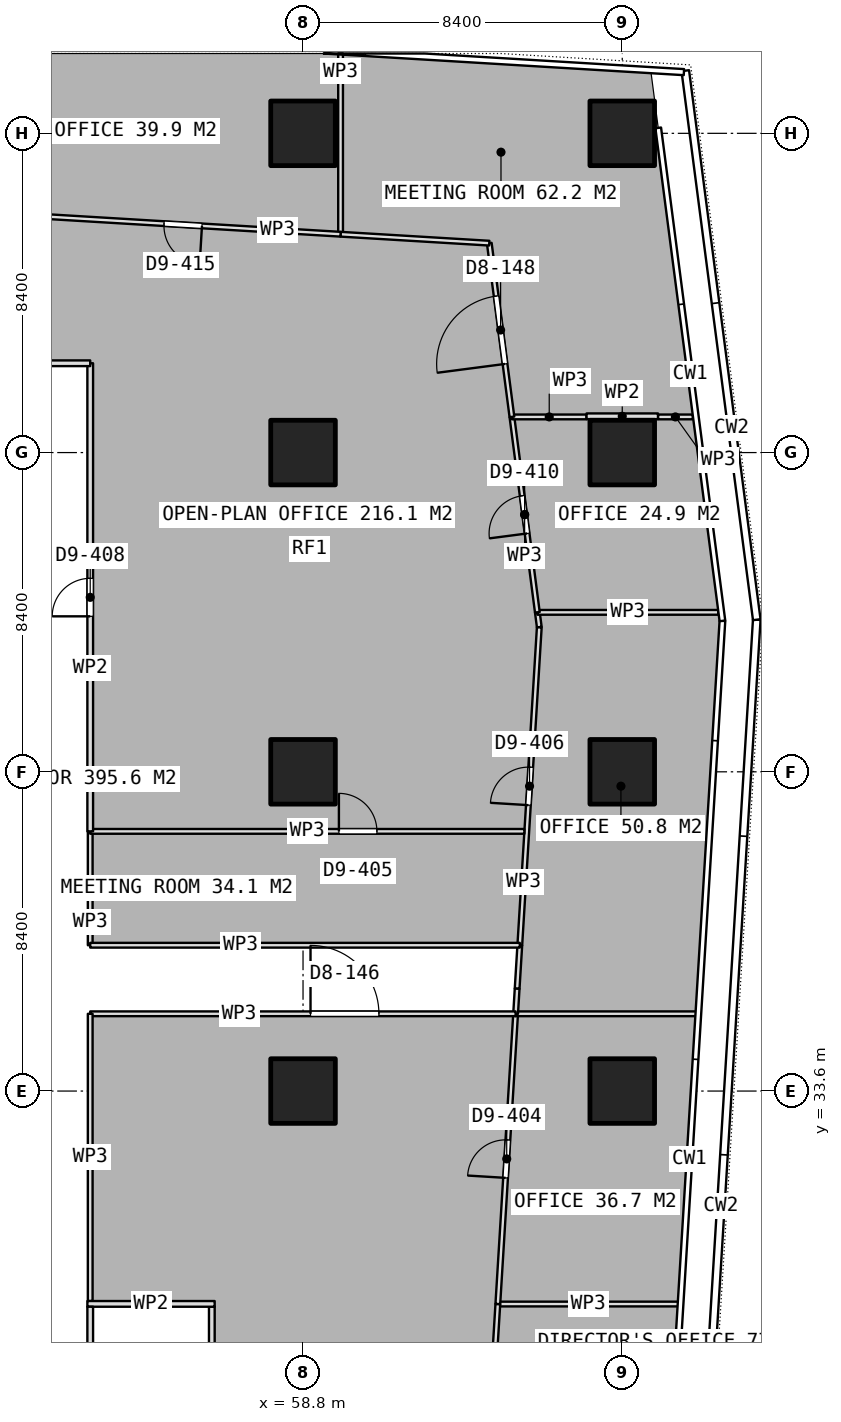
"""IFC4 building model, lengths in metres.
Left out: names, types, materials, properties, quantities, classifications, styles, units other than length and angle.
Written with IfcOpenShell. Run it as: python <this file> out.ifc"""

import sys

from ifc_helpers import new_model, si_unit, direction, frame, frame_2d, origin, origin_2d, place, context, subcontext, project, spatial, rectangle, extrude, element, fill, save


model = new_model("IFC4")
c1 = context("Model", 3, precision=1e-05, world=origin(), true_north=direction((0.0, 1.0)))
c2 = subcontext(c1, "Body", "Model", "MODEL_VIEW")
j1 = project(units=[si_unit("LENGTHUNIT", "METRE"), si_unit("PLANEANGLEUNIT", "RADIAN")], contexts=[c1])
p1 = place(None, origin())
s1 = spatial("IfcSite", under=j1, at=p1, CompositionType="ELEMENT")
p2 = place(p1, origin())
s2 = spatial("IfcBuilding", under=s1, at=p2, CompositionType="ELEMENT")
p3 = place(p2, frame((0.0, 0.0, 114.05)))
s3 = spatial("IfcBuildingStorey", under=s2, at=p3, CompositionType="ELEMENT", Elevation=114.05)
for number, where, z_axis, x_axis in (
    (1, (58.8, 33.6, 0.0), (0.0, 0.0, 1.0), (1.0, 0.0, 0.0)),
    (2, (58.8, 42.0, 0.0), (0.0, 0.0, 1.0), (1.0, 0.0, 0.0)),
    (3, (58.8, 50.4, 0.0), (0.0, 0.0, 1.0), (1.0, 0.0, 0.0)),
    (4, (58.8, 58.8, 0.0), (0.0, 0.0, 1.0), (1.0, 0.0, 0.0)),
    (5, (67.2, 33.6, 0.0), (0.0, 0.0, 1.0), (1.0, 0.0, 0.0)),
    (6, (67.2, 42.0, 0.0), (0.0, 0.0, 1.0), (1.0, 0.0, 0.0)),
    (7, (67.2, 50.4, 0.0), (0.0, 0.0, 1.0), (1.0, 0.0, 0.0)),
    (8, (67.2, 58.8, 0.0), (0.0, 0.0, 1.0), (1.0, 0.0, 0.0)),
):
    element("IfcColumn", number, at=place(p3, frame(where, z_axis=z_axis, x_axis=x_axis)), inside=s3, PredefinedType="COLUMN", context=c2, shape_type="SweptSolid", body=[
        extrude(rectangle(XDim=1.7, YDim=1.7, at=origin_2d()), origin(), (0.0, 0.0, 1.0), 3.75),
    ])
p4 = place(p3, frame((53.125, 28.0, 0.0), z_axis=(0.0, 0.0, 1.0), x_axis=(1.0, 0.0, 0.0)))
e9 = element("IfcWall", 9, at=p4, inside=s3, PredefinedType="PARTITIONING", context=c2, shape_type="SweptSolid", body=[
    extrude(rectangle(XDim=3.35, YDim=0.15, at=frame_2d((1.675, 0.0))), origin(), (0.0, 0.0, 1.0), 3.5),
])
p5 = place(p3, frame((53.2, 21.075, 0.0), z_axis=(0.0, 0.0, 1.0), x_axis=(0.0, 1.0, 0.0)))
e10 = element("IfcWall", 10, at=p5, inside=s3, PredefinedType="PARTITIONING", context=c2, shape_type="SweptSolid", body=[
    extrude(rectangle(XDim=6.85, YDim=0.15, at=frame_2d((3.425, 0.0))), origin(), (0.0, 0.0, 1.0), 3.5),
])
p6 = place(p5, frame((2.925, 0.0, 0.0)))
e11 = element("IfcOpeningElement", 11, at=p6, cuts=e10, PredefinedType="OPENING", context=c2, shape_type="SweptSolid", body=[
    extrude(rectangle(XDim=1.0, YDim=2.1, at=frame_2d((0.5, 1.05))), frame((0.0, 0.085, 0.0), z_axis=(0.0, -1.0, 0.0), x_axis=(1.0, 0.0, 0.0)), (0.0, 0.0, 1.0), 0.17),
])
p7 = place(p3, frame((56.4, 21.075, 0.0), z_axis=(0.0, 0.0, 1.0), x_axis=(0.0, 1.0, 0.0)))
e12 = element("IfcWall", 12, at=p7, inside=s3, PredefinedType="PARTITIONING", context=c2, shape_type="SweptSolid", body=[
    extrude(rectangle(XDim=6.85, YDim=0.15, at=frame_2d((3.425, 0.0))), origin(), (0.0, 0.0, 1.0), 3.5),
])
p8 = place(p3, frame((63.926, 27.996, 0.0), z_axis=(0.0, 0.0, 1.0), x_axis=(1.0, 0.0, 0.0)))
e13 = element("IfcWall", 13, at=p8, inside=s3, PredefinedType="PARTITIONING", context=c2, shape_type="SweptSolid", body=[
    extrude(rectangle(XDim=4.758, YDim=0.125, at=frame_2d((2.379, 0.0))), origin(), (0.0, 0.0, 1.0), 3.5),
])
p9 = place(p3, frame((63.476, 20.65, 0.0), z_axis=(0.0, 0.0, 1.0), x_axis=(0.061135017565, 0.998129505439, 0.0)))
e14 = element("IfcWall", 14, at=p9, inside=s3, PredefinedType="PARTITIONING", context=c2, shape_type="SweptSolid", body=[
    extrude(rectangle(XDim=7.36, YDim=0.125, at=frame_2d((3.68, 0.0))), origin(), (0.0, 0.0, 1.0), 3.5),
])
p10 = place(p9, frame((3.18, 0.0, 0.0)))
e15 = element("IfcOpeningElement", 15, at=p10, cuts=e14, PredefinedType="OPENING", context=c2, shape_type="SweptSolid", body=[
    extrude(rectangle(XDim=1.0, YDim=2.1, at=frame_2d((0.5, 1.05))), frame((0.0, 0.073, 0.0), z_axis=(0.0, -1.0, 0.0), x_axis=(1.0, 0.0, 0.0)), (0.0, 0.0, 1.0), 0.145),
])
p11 = place(p9, frame((2.08, 0.0, 0.0)))
e16 = element("IfcOpeningElement", 16, at=p11, cuts=e14, PredefinedType="OPENING", context=c2, shape_type="SweptSolid", body=[
    extrude(rectangle(XDim=1.0, YDim=2.1, at=frame_2d((0.5, 1.05))), frame((0.0, 0.073, 0.0), z_axis=(0.0, -1.0, 0.0), x_axis=(1.0, 0.0, 0.0)), (0.0, 0.0, 1.0), 0.145),
])
p12 = place(p3, frame((63.926, 27.997, 0.0), z_axis=(0.0, 0.0, 1.0), x_axis=(0.061176245149, 0.998126979412, 0.0)))
e17 = element("IfcWall", 17, at=p12, inside=s3, PredefinedType="PARTITIONING", context=c2, shape_type="SweptSolid", body=[
    extrude(rectangle(XDim=7.65, YDim=0.125, at=frame_2d((3.825, 0.0))), origin(), (0.0, 0.0, 1.0), 3.5),
])
p13 = place(p12, frame((3.325, 0.0, 0.0)))
e18 = element("IfcOpeningElement", 18, at=p13, cuts=e17, PredefinedType="OPENING", context=c2, shape_type="SweptSolid", body=[
    extrude(rectangle(XDim=1.0, YDim=2.1, at=frame_2d((0.5, 1.05))), frame((0.0, 0.073, 0.0), z_axis=(0.0, -1.0, 0.0), x_axis=(1.0, 0.0, 0.0)), (0.0, 0.0, 1.0), 0.145),
])
p14 = place(p3, frame((64.394, 35.633, 0.0), z_axis=(0.0, 0.0, 1.0), x_axis=(1.0, 0.0, 0.0)))
e19 = element("IfcWall", 19, at=p14, inside=s3, PredefinedType="PARTITIONING", context=c2, shape_type="SweptSolid", body=[
    extrude(rectangle(XDim=4.758, YDim=0.125, at=frame_2d((2.379, 0.0))), origin(), (0.0, 0.0, 1.0), 3.5),
])
p15 = place(p3, frame((64.434, 36.293, 0.0), z_axis=(0.0, 0.0, 1.0), x_axis=(0.060919506416, 0.998142682054, 0.0)))
e20 = element("IfcWall", 20, at=p15, inside=s3, PredefinedType="PARTITIONING", context=c2, shape_type="SweptSolid", body=[
    extrude(rectangle(XDim=1.146, YDim=0.125, at=frame_2d((0.573, 0.0))), origin(), (0.0, 0.0, 1.0), 3.5),
])
p16 = place(p3, frame((64.504, 37.437, 0.0), z_axis=(0.0, 0.0, 1.0), x_axis=(0.061198263672, 0.99812562963, 0.0)))
e21 = element("IfcWall", 21, at=p16, inside=s3, PredefinedType="PARTITIONING", context=c2, shape_type="SweptSolid", body=[
    extrude(rectangle(XDim=8.385, YDim=0.125, at=frame_2d((4.193, 0.0))), origin(), (0.0, 0.0, 1.0), 3.5),
])
p17 = place(p16, frame((3.693, 0.0, 0.0)))
e22 = element("IfcOpeningElement", 22, at=p17, cuts=e21, PredefinedType="OPENING", context=c2, shape_type="SweptSolid", body=[
    extrude(rectangle(XDim=1.0, YDim=2.1, at=frame_2d((0.5, 1.05))), frame((0.0, 0.073, 0.0), z_axis=(0.0, -1.0, 0.0), x_axis=(1.0, 0.0, 0.0)), (0.0, 0.0, 1.0), 0.145),
])
p18 = place(p3, frame((65.017, 45.807, 0.0), z_axis=(0.0, 0.0, 1.0), x_axis=(-0.130003962442, 0.991513474316, 0.0)))
e23 = element("IfcWall", 23, at=p18, inside=s3, PredefinedType="PARTITIONING", context=c2, shape_type="SweptSolid", body=[
    extrude(rectangle(XDim=0.393, YDim=0.125, at=frame_2d((0.196, 0.0))), origin(), (0.0, 0.0, 1.0), 3.5),
])
p19 = place(p3, frame((64.966, 46.196, 0.0), z_axis=(0.0, 0.0, 1.0), x_axis=(1.0, 0.0, 0.0)))
e24 = element("IfcWall", 24, at=p19, inside=s3, PredefinedType="PARTITIONING", context=c2, shape_type="SweptSolid", body=[
    extrude(rectangle(XDim=4.76, YDim=0.125, at=frame_2d((2.38, 0.0))), origin(), (0.0, 0.0, 1.0), 3.5),
])
p20 = place(p3, frame((64.394, 35.634, 0.0), z_axis=(0.0, 0.0, 1.0), x_axis=(0.060651381141, 0.998159010361, 0.0)))
e25 = element("IfcWall", 25, at=p20, inside=s3, PredefinedType="PARTITIONING", context=c2, shape_type="SweptSolid", body=[
    extrude(rectangle(XDim=0.66, YDim=0.125, at=frame_2d((0.33, 0.0))), origin(), (0.0, 0.0, 1.0), 3.5),
])
p21 = place(p3, frame((64.966, 46.197, 0.0), z_axis=(0.0, 0.0, 1.0), x_axis=(-0.12903517346, 0.99164001735, 0.0)))
e26 = element("IfcWall", 26, at=p21, inside=s3, PredefinedType="PARTITIONING", context=c2, shape_type="SweptSolid", body=[
    extrude(rectangle(XDim=5.184, YDim=0.125, at=frame_2d((2.592, 0.0))), origin(), (0.0, 0.0, 1.0), 3.5),
])
p22 = place(p21, frame((2.092, 0.0, 0.0)))
e27 = element("IfcOpeningElement", 27, at=p22, cuts=e26, PredefinedType="OPENING", context=c2, shape_type="SweptSolid", body=[
    extrude(rectangle(XDim=1.0, YDim=2.1, at=frame_2d((0.5, 1.05))), frame((0.0, 0.073, 0.0), z_axis=(0.0, -1.0, 0.0), x_axis=(1.0, 0.0, 0.0)), (0.0, 0.0, 1.0), 0.145),
])
p23 = place(p3, frame((64.297, 51.338, 0.0), z_axis=(0.0, 0.0, 1.0), x_axis=(1.0, 0.0, 0.0)))
e28 = element("IfcWall", 28, at=p23, inside=s3, PredefinedType="PARTITIONING", context=c2, shape_type="SweptSolid", body=[
    extrude(rectangle(XDim=1.963, YDim=0.125, at=frame_2d((0.981, 0.0))), origin(), (0.0, 0.0, 1.0), 3.5),
])
p24 = place(p3, frame((68.14, 51.338, 0.0), z_axis=(0.0, 0.0, 1.0), x_axis=(1.0, 0.0, 0.0)))
e29 = element("IfcWall", 29, at=p24, inside=s3, PredefinedType="PARTITIONING", context=c2, shape_type="SweptSolid", body=[
    extrude(rectangle(XDim=0.917, YDim=0.125, at=frame_2d((0.458, 0.0))), origin(), (0.0, 0.0, 1.0), 3.5),
])
p25 = place(p3, frame((59.788, 56.145, 0.0), z_axis=(0.0, 0.0, 1.0), x_axis=(0.0, 1.0, 0.0)))
e30 = element("IfcWall", 30, at=p25, inside=s3, PredefinedType="PARTITIONING", context=c2, shape_type="SweptSolid", body=[
    extrude(rectangle(XDim=4.758, YDim=0.125, at=frame_2d((2.379, 0.0))), origin(), (0.0, 0.0, 1.0), 3.5),
])
p26 = place(p3, frame((64.297, 51.339, 0.0), z_axis=(0.0, 0.0, 1.0), x_axis=(-0.129339184068, 0.991600411186, 0.0)))
e31 = element("IfcWall", 31, at=p26, inside=s3, PredefinedType="PARTITIONING", context=c2, shape_type="SweptSolid", body=[
    extrude(rectangle(XDim=4.61, YDim=0.125, at=frame_2d((2.305, 0.0))), origin(), (0.0, 0.0, 1.0), 3.5),
])
p27 = place(p26, frame((1.405, 0.0, 0.0)))
e32 = element("IfcOpeningElement", 32, at=p27, cuts=e31, PredefinedType="OPENING", context=c2, shape_type="SweptSolid", body=[
    extrude(rectangle(XDim=1.8, YDim=2.1, at=frame_2d((0.9, 1.05))), frame((0.0, 0.073, 0.0), z_axis=(0.0, -1.0, 0.0), x_axis=(1.0, 0.0, 0.0)), (0.0, 0.0, 1.0), 0.145),
])
p28 = place(p3, frame((63.701, 55.91, 0.0), z_axis=(0.0, 0.0, 1.0), x_axis=(-0.998199703309, 0.059977931883, 0.0)))
e33 = element("IfcWall", 33, at=p28, inside=s3, PredefinedType="PARTITIONING", context=c2, shape_type="SweptSolid", body=[
    extrude(rectangle(XDim=3.92, YDim=0.125, at=frame_2d((1.96, 0.0))), origin(), (0.0, 0.0, 1.0), 3.5),
])
p29 = place(p3, frame((59.787, 56.145, 0.0), z_axis=(0.0, 0.0, 1.0), x_axis=(-0.998201048184, 0.059955545233, 0.0)))
e34 = element("IfcWall", 34, at=p29, inside=s3, PredefinedType="PARTITIONING", context=c2, shape_type="SweptSolid", body=[
    extrude(rectangle(XDim=8.307, YDim=0.125, at=frame_2d((4.153, 0.0))), origin(), (0.0, 0.0, 1.0), 3.5),
])
p30 = place(p29, frame((3.653, 0.0, 0.0)))
e35 = element("IfcOpeningElement", 35, at=p30, cuts=e34, PredefinedType="OPENING", context=c2, shape_type="SweptSolid", body=[
    extrude(rectangle(XDim=1.0, YDim=2.1, at=frame_2d((0.5, 1.05))), frame((0.0, 0.073, 0.0), z_axis=(0.0, -1.0, 0.0), x_axis=(1.0, 0.0, 0.0)), (0.0, 0.0, 1.0), 0.145),
])
p31 = place(p3, frame((53.2, 35.633, 0.0), z_axis=(0.0, 0.0, 1.0), x_axis=(1.0, 0.0, 0.0)))
e36 = element("IfcWall", 36, at=p31, inside=s3, PredefinedType="PARTITIONING", context=c2, shape_type="SweptSolid", body=[
    extrude(rectangle(XDim=11.194, YDim=0.125, at=frame_2d((5.597, 0.0))), origin(), (0.0, 0.0, 1.0), 3.5),
])
p32 = place(p31, frame((5.797, 0.0, 0.0)))
e37 = element("IfcOpeningElement", 37, at=p32, cuts=e36, PredefinedType="OPENING", context=c2, shape_type="SweptSolid", body=[
    extrude(rectangle(XDim=1.8, YDim=2.1, at=frame_2d((0.9, 1.05))), frame((0.0, 0.073, 0.0), z_axis=(0.0, -1.0, 0.0), x_axis=(1.0, 0.0, 0.0)), (0.0, 0.0, 1.0), 0.145),
])
p33 = place(p3, frame((53.2, 28.075, 0.0), z_axis=(0.0, 0.0, 1.0), x_axis=(0.0, 1.0, 0.0)))
e38 = element("IfcWall", 38, at=p33, inside=s3, PredefinedType="PARTITIONING", context=c2, shape_type="SweptSolid", body=[
    extrude(rectangle(XDim=7.558, YDim=0.125, at=frame_2d((3.779, 0.0))), origin(), (0.0, 0.0, 1.0), 3.5),
])
p34 = place(p3, frame((53.2, 37.437, 0.0), z_axis=(0.0, 0.0, 1.0), x_axis=(0.0, 1.0, 0.0)))
e39 = element("IfcWall", 39, at=p34, inside=s3, PredefinedType="PARTITIONING", context=c2, shape_type="SweptSolid", body=[
    extrude(rectangle(XDim=2.996, YDim=0.125, at=frame_2d((1.498, 0.0))), origin(), (0.0, 0.0, 1.0), 3.5),
])
p35 = place(p3, frame((53.2, 40.433, 0.0), z_axis=(0.0, 0.0, 1.0), x_axis=(1.0, 0.0, 0.0)))
e40 = element("IfcWall", 40, at=p35, inside=s3, PredefinedType="PARTITIONING", context=c2, shape_type="SweptSolid", body=[
    extrude(rectangle(XDim=11.425, YDim=0.125, at=frame_2d((5.712, 0.0))), origin(), (0.0, 0.0, 1.0), 3.5),
])
p36 = place(p35, frame((6.544, 0.0, 0.0)))
e41 = element("IfcOpeningElement", 41, at=p36, cuts=e40, PredefinedType="OPENING", context=c2, shape_type="SweptSolid", body=[
    extrude(rectangle(XDim=1.0, YDim=2.1, at=frame_2d((0.5, 1.05))), frame((0.0, 0.073, 0.0), z_axis=(0.0, -1.0, 0.0), x_axis=(1.0, 0.0, 0.0)), (0.0, 0.0, 1.0), 0.145),
])
p37 = place(p3, frame((64.504, 37.437, 0.0), z_axis=(0.0, 0.0, 1.0), x_axis=(-1.0, 0.0, 0.0)))
e42 = element("IfcWall", 42, at=p37, inside=s3, PredefinedType="PARTITIONING", context=c2, shape_type="SweptSolid", body=[
    extrude(rectangle(XDim=11.304, YDim=0.125, at=frame_2d((5.652, 0.0))), origin(), (0.0, 0.0, 1.0), 3.5),
])
p38 = place(p3, frame((68.14, 51.355, 0.0), z_axis=(0.0, 0.0, 1.0), x_axis=(-1.0, 0.0, 0.0)))
e43 = element("IfcWall", 43, at=p38, inside=s3, PredefinedType="PARTITIONING", context=c2, shape_type="SweptSolid", body=[
    extrude(rectangle(XDim=1.88, YDim=0.15, at=frame_2d((0.94, 0.0))), origin(), (0.0, 0.0, 1.0), 3.5),
])
p39 = place(p3, frame((53.2, 40.433, 0.0), z_axis=(0.0, 0.0, 1.0), x_axis=(0.0, 1.0, 0.0)))
e44 = element("IfcWall", 44, at=p39, inside=s3, PredefinedType="PARTITIONING", context=c2, shape_type="SweptSolid", body=[
    extrude(rectangle(XDim=12.317, YDim=0.15, at=frame_2d((6.158, 0.0))), origin(), (0.0, 0.0, 1.0), 3.5),
])
p40 = place(p39, frame((5.658, 0.0, 0.0)))
e45 = element("IfcOpeningElement", 45, at=p40, cuts=e44, PredefinedType="OPENING", context=c2, shape_type="SweptSolid", body=[
    extrude(rectangle(XDim=1.0, YDim=2.1, at=frame_2d((0.5, 1.05))), frame((0.0, 0.085, 0.0), z_axis=(0.0, -1.0, 0.0), x_axis=(1.0, 0.0, 0.0)), (0.0, 0.0, 1.0), 0.17),
])
p41 = place(p3, frame((53.2, 52.75, 0.0), z_axis=(0.0, 0.0, 1.0), x_axis=(-1.0, 0.0, 0.0)))
e46 = element("IfcWall", 46, at=p41, inside=s3, PredefinedType="PARTITIONING", context=c2, shape_type="SweptSolid", body=[
    extrude(rectangle(XDim=9.196, YDim=0.15, at=frame_2d((4.598, 0.0))), origin(), (0.0, 0.0, 1.0), 3.5),
])
p42 = place(p17, origin())
e47 = element("IfcDoor", 47, at=p42, inside=s3, OperationType="SINGLE_SWING_LEFT", PredefinedType="DOOR", context=c2, shape_type="SweptSolid", body=[
    extrude(rectangle(XDim=1.0, YDim=2.1, at=frame_2d((0.5, 1.05))), frame((0.0, 0.025, 0.0), z_axis=(0.0, -1.0, 0.0), x_axis=(1.0, 0.0, 0.0)), (0.0, 0.0, 1.0), 0.05),
])
fill(e22, e47)
p43 = place(p22, origin())
e48 = element("IfcDoor", 48, at=p43, inside=s3, OperationType="SINGLE_SWING_LEFT", PredefinedType="DOOR", context=c2, shape_type="SweptSolid", body=[
    extrude(rectangle(XDim=1.0, YDim=2.1, at=frame_2d((0.5, 1.05))), frame((0.0, 0.025, 0.0), z_axis=(0.0, -1.0, 0.0), x_axis=(1.0, 0.0, 0.0)), (0.0, 0.0, 1.0), 0.05),
])
fill(e27, e48)
p44 = place(p27, origin())
e49 = element("IfcDoor", 49, at=p44, inside=s3, OperationType="DOUBLE_DOOR_SINGLE_SWING", PredefinedType="DOOR", context=c2, shape_type="SweptSolid", body=[
    extrude(rectangle(XDim=1.8, YDim=2.1, at=frame_2d((0.9, 1.05))), frame((0.0, 0.025, 0.0), z_axis=(0.0, -1.0, 0.0), x_axis=(1.0, 0.0, 0.0)), (0.0, 0.0, 1.0), 0.05),
])
fill(e32, e49)
p45 = place(p30, origin())
e50 = element("IfcDoor", 50, at=p45, inside=s3, OperationType="SINGLE_SWING_LEFT", PredefinedType="DOOR", context=c2, shape_type="SweptSolid", body=[
    extrude(rectangle(XDim=1.0, YDim=2.1, at=frame_2d((0.5, 1.05))), frame((0.0, 0.025, 0.0), z_axis=(0.0, -1.0, 0.0), x_axis=(1.0, 0.0, 0.0)), (0.0, 0.0, 1.0), 0.05),
])
fill(e35, e50)
p46 = place(p32, origin())
e51 = element("IfcDoor", 51, at=p46, inside=s3, OperationType="DOUBLE_DOOR_SINGLE_SWING", PredefinedType="DOOR", context=c2, shape_type="SweptSolid", body=[
    extrude(rectangle(XDim=1.8, YDim=2.1, at=frame_2d((0.9, 1.05))), frame((0.0, 0.025, 0.0), z_axis=(0.0, -1.0, 0.0), x_axis=(1.0, 0.0, 0.0)), (0.0, 0.0, 1.0), 0.05),
])
fill(e37, e51)
p47 = place(p36, origin())
e52 = element("IfcDoor", 52, at=p47, inside=s3, OperationType="SINGLE_SWING_LEFT", PredefinedType="DOOR", context=c2, shape_type="SweptSolid", body=[
    extrude(rectangle(XDim=1.0, YDim=2.1, at=frame_2d((0.5, 1.05))), frame((0.0, 0.025, 0.0), z_axis=(0.0, -1.0, 0.0), x_axis=(1.0, 0.0, 0.0)), (0.0, 0.0, 1.0), 0.05),
])
fill(e41, e52)
p48 = place(p40, origin())
e53 = element("IfcDoor", 53, at=p48, inside=s3, OperationType="SINGLE_SWING_LEFT", PredefinedType="DOOR", context=c2, shape_type="SweptSolid", body=[
    extrude(rectangle(XDim=1.0, YDim=2.1, at=frame_2d((0.5, 1.05))), frame((0.0, 0.025, 0.0), z_axis=(0.0, -1.0, 0.0), x_axis=(1.0, 0.0, 0.0)), (0.0, 0.0, 1.0), 0.05),
])
fill(e45, e53)
p49 = place(p13, origin())
e54 = element("IfcDoor", 54, at=p49, inside=s3, OperationType="SINGLE_SWING_LEFT", PredefinedType="DOOR", context=c2, shape_type="SweptSolid", body=[
    extrude(rectangle(XDim=1.0, YDim=2.1, at=frame_2d((0.5, 1.05))), frame((0.0, 0.025, 0.0), z_axis=(0.0, -1.0, 0.0), x_axis=(1.0, 0.0, 0.0)), (0.0, 0.0, 1.0), 0.05),
])
fill(e18, e54)
save(model, sys.argv[1])
